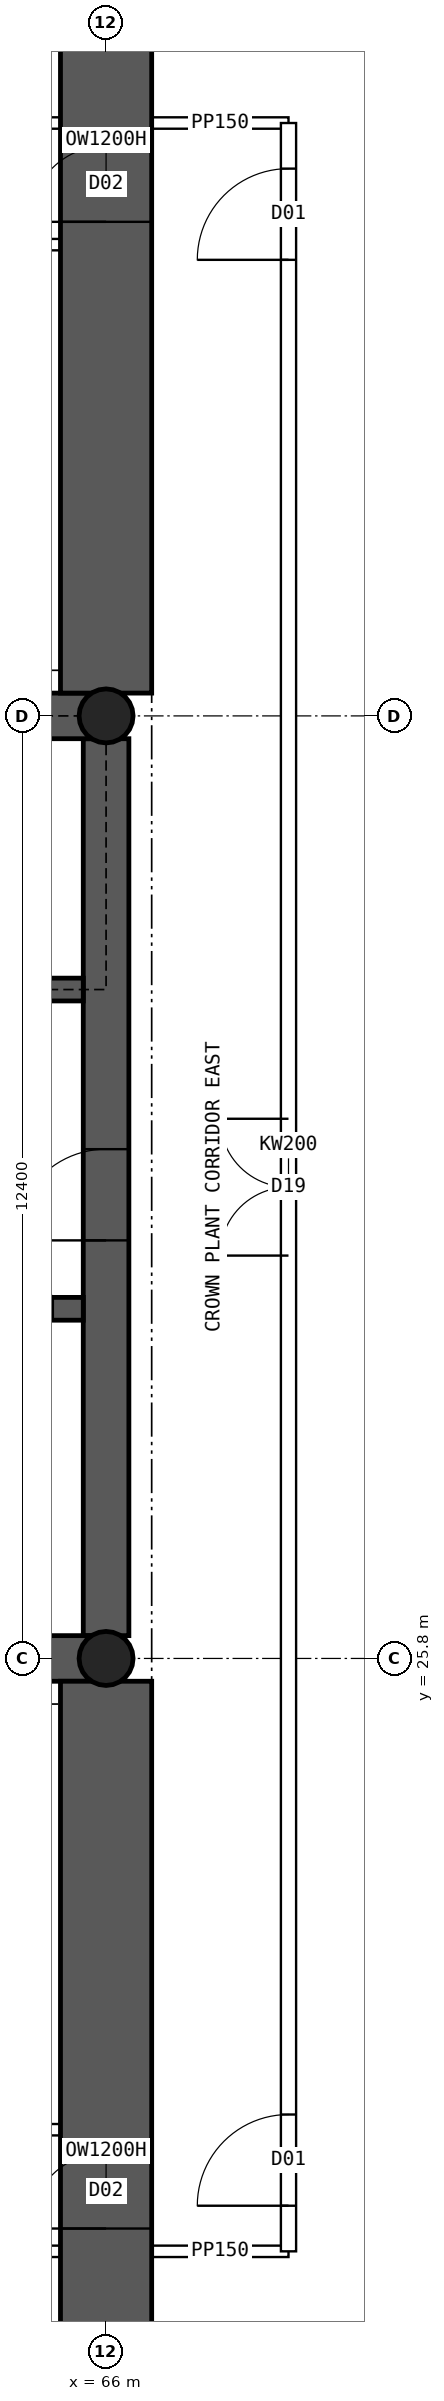
"""IFC4 building model, lengths in metres.
Left out: names, types, materials, properties, quantities, classifications, styles, units other than length and angle.
Written with IfcOpenShell. Run it as: python <this file> out.ifc"""

import sys

from ifc_helpers import new_model, si_unit, direction, frame, frame_2d, origin, origin_2d, place, context, subcontext, project, spatial, rectangle, hollow_circle, extrude, element, fill, save


model = new_model("IFC4")
c1 = context("Model", 3, precision=1e-05, world=origin(), true_north=direction((0.0, 1.0)))
c2 = subcontext(c1, "Body", "Model", "MODEL_VIEW")
j1 = project(units=[si_unit("LENGTHUNIT", "METRE"), si_unit("PLANEANGLEUNIT", "RADIAN")], contexts=[c1])
p1 = place(None, origin())
s1 = spatial("IfcSite", under=j1, at=p1, CompositionType="ELEMENT")
p2 = place(p1, origin())
s2 = spatial("IfcBuilding", under=s1, at=p2, CompositionType="ELEMENT")
p3 = place(p2, frame((0.0, 0.0, 262.3)))
s3 = spatial("IfcBuildingStorey", under=s2, at=p3, CompositionType="ELEMENT", Elevation=262.3)
for number, where, z_axis, x_axis in (
    (1, (18.0, 25.8, 0.0), (0.0, 0.0, 1.0), (1.0, 0.0, 0.0)),
    (2, (18.0, 38.2, 0.0), (0.0, 0.0, 1.0), (1.0, 0.0, 0.0)),
):
    element("IfcWall", number, at=place(p3, frame(where, z_axis=z_axis, x_axis=x_axis)), inside=s3, PredefinedType="SHEAR", context=c2, shape_type="SweptSolid", body=[
        extrude(rectangle(XDim=48.0, YDim=0.6, at=frame_2d((24.0, 0.0))), origin(), (0.0, 0.0, 1.0), 6.0),
    ])
p4 = place(p3, frame((66.0, 26.1, 0.0), z_axis=(0.0, 0.0, 1.0), x_axis=(0.0, 1.0, 0.0)))
e3 = element("IfcWall", 3, at=p4, inside=s3, PredefinedType="SHEAR", context=c2, shape_type="SweptSolid", body=[
    extrude(rectangle(XDim=11.8, YDim=0.6, at=frame_2d((5.9, 0.0))), origin(), (0.0, 0.0, 1.0), 6.0),
])
p5 = place(p4, frame((5.2, 0.0, 0.0)))
e4 = element("IfcOpeningElement", 4, at=p5, cuts=e3, PredefinedType="OPENING", context=c2, shape_type="SweptSolid", body=[
    extrude(rectangle(XDim=1.2, YDim=2.1, at=frame_2d((0.6, 1.05))), frame((0.0, 0.31, 0.0), z_axis=(0.0, -1.0, 0.0), x_axis=(1.0, 0.0, 0.0)), (0.0, 0.0, 1.0), 0.62),
])
p6 = place(p3, frame((18.3, 30.4, 0.0), z_axis=(0.0, 0.0, 1.0), x_axis=(1.0, 0.0, 0.0)))
e5 = element("IfcWall", 5, at=p6, inside=s3, PredefinedType="SHEAR", context=c2, shape_type="SweptSolid", body=[
    extrude(rectangle(XDim=47.4, YDim=0.3, at=frame_2d((23.7, 0.0))), origin(), (0.0, 0.0, 1.0), 6.0),
])
p7 = place(p6, frame((0.4, 0.0, 0.0)))
e6 = element("IfcOpeningElement", 6, at=p7, cuts=e5, PredefinedType="OPENING", context=c2, shape_type="SweptSolid", body=[
    extrude(rectangle(XDim=1.0, YDim=2.1, at=frame_2d((0.5, 1.05))), frame((0.0, 0.16, 0.0), z_axis=(0.0, -1.0, 0.0), x_axis=(1.0, 0.0, 0.0)), (0.0, 0.0, 1.0), 0.32),
])
p8 = place(p6, frame((46.0, 0.0, 0.0)))
e7 = element("IfcOpeningElement", 7, at=p8, cuts=e5, PredefinedType="OPENING", context=c2, shape_type="SweptSolid", body=[
    extrude(rectangle(XDim=1.0, YDim=2.1, at=frame_2d((0.5, 1.05))), frame((0.0, 0.16, 0.0), z_axis=(0.0, -1.0, 0.0), x_axis=(1.0, 0.0, 0.0)), (0.0, 0.0, 1.0), 0.32),
])
p9 = place(p6, frame((19.025, 0.0, 0.0)))
e8 = element("IfcOpeningElement", 8, at=p9, cuts=e5, PredefinedType="OPENING", context=c2, shape_type="SweptSolid", body=[
    extrude(rectangle(XDim=0.9, YDim=2.1, at=frame_2d((0.45, 1.05))), frame((0.0, 0.16, 0.0), z_axis=(0.0, -1.0, 0.0), x_axis=(1.0, 0.0, 0.0)), (0.0, 0.0, 1.0), 0.32),
])
p10 = place(p6, frame((24.525, 0.0, 0.0)))
e9 = element("IfcOpeningElement", 9, at=p10, cuts=e5, PredefinedType="OPENING", context=c2, shape_type="SweptSolid", body=[
    extrude(rectangle(XDim=0.9, YDim=2.1, at=frame_2d((0.45, 1.05))), frame((0.0, 0.16, 0.0), z_axis=(0.0, -1.0, 0.0), x_axis=(1.0, 0.0, 0.0)), (0.0, 0.0, 1.0), 0.32),
])
p11 = place(p6, frame((30.317, 0.0, 0.0)))
e10 = element("IfcOpeningElement", 10, at=p11, cuts=e5, PredefinedType="OPENING", context=c2, shape_type="SweptSolid", body=[
    extrude(rectangle(XDim=1.1, YDim=2.1, at=frame_2d((0.55, 1.05))), frame((0.0, 0.16, 0.0), z_axis=(0.0, -1.0, 0.0), x_axis=(1.0, 0.0, 0.0)), (0.0, 0.0, 1.0), 0.32),
])
p12 = place(p6, frame((33.85, 0.0, 0.0)))
e11 = element("IfcOpeningElement", 11, at=p12, cuts=e5, PredefinedType="OPENING", context=c2, shape_type="SweptSolid", body=[
    extrude(rectangle(XDim=1.1, YDim=2.1, at=frame_2d((0.55, 1.05))), frame((0.0, 0.16, 0.0), z_axis=(0.0, -1.0, 0.0), x_axis=(1.0, 0.0, 0.0)), (0.0, 0.0, 1.0), 0.32),
])
p13 = place(p6, frame((37.383, 0.0, 0.0)))
e12 = element("IfcOpeningElement", 12, at=p13, cuts=e5, PredefinedType="OPENING", context=c2, shape_type="SweptSolid", body=[
    extrude(rectangle(XDim=1.1, YDim=2.1, at=frame_2d((0.55, 1.05))), frame((0.0, 0.16, 0.0), z_axis=(0.0, -1.0, 0.0), x_axis=(1.0, 0.0, 0.0)), (0.0, 0.0, 1.0), 0.32),
])
p14 = place(p3, frame((18.3, 34.6, 0.0), z_axis=(0.0, 0.0, 1.0), x_axis=(1.0, 0.0, 0.0)))
e13 = element("IfcWall", 13, at=p14, inside=s3, PredefinedType="SHEAR", context=c2, shape_type="SweptSolid", body=[
    extrude(rectangle(XDim=47.4, YDim=0.3, at=frame_2d((23.7, 0.0))), origin(), (0.0, 0.0, 1.0), 6.0),
])
p15 = place(p14, frame((0.9, 0.0, 0.0)))
e14 = element("IfcOpeningElement", 14, at=p15, cuts=e13, PredefinedType="OPENING", context=c2, shape_type="SweptSolid", body=[
    extrude(rectangle(XDim=1.1, YDim=2.1, at=frame_2d((0.55, 1.05))), frame((0.0, 0.16, 0.0), z_axis=(0.0, -1.0, 0.0), x_axis=(1.0, 0.0, 0.0)), (0.0, 0.0, 1.0), 0.32),
])
p16 = place(p14, frame((45.4, 0.0, 0.0)))
e15 = element("IfcOpeningElement", 15, at=p16, cuts=e13, PredefinedType="OPENING", context=c2, shape_type="SweptSolid", body=[
    extrude(rectangle(XDim=1.1, YDim=2.1, at=frame_2d((0.55, 1.05))), frame((0.0, 0.16, 0.0), z_axis=(0.0, -1.0, 0.0), x_axis=(1.0, 0.0, 0.0)), (0.0, 0.0, 1.0), 0.32),
])
p17 = place(p14, frame((4.3, 0.0, 0.0)))
e16 = element("IfcOpeningElement", 16, at=p17, cuts=e13, PredefinedType="OPENING", context=c2, shape_type="SweptSolid", body=[
    extrude(rectangle(XDim=0.9, YDim=2.1, at=frame_2d((0.45, 1.05))), frame((0.0, 0.16, 0.0), z_axis=(0.0, -1.0, 0.0), x_axis=(1.0, 0.0, 0.0)), (0.0, 0.0, 1.0), 0.32),
])
p18 = place(p14, frame((42.2, 0.0, 0.0)))
e17 = element("IfcOpeningElement", 17, at=p18, cuts=e13, PredefinedType="OPENING", context=c2, shape_type="SweptSolid", body=[
    extrude(rectangle(XDim=0.9, YDim=2.1, at=frame_2d((0.45, 1.05))), frame((0.0, 0.16, 0.0), z_axis=(0.0, -1.0, 0.0), x_axis=(1.0, 0.0, 0.0)), (0.0, 0.0, 1.0), 0.32),
])
p19 = place(p14, frame((9.075, 0.0, 0.0)))
e18 = element("IfcOpeningElement", 18, at=p19, cuts=e13, PredefinedType="OPENING", context=c2, shape_type="SweptSolid", body=[
    extrude(rectangle(XDim=0.9, YDim=2.1, at=frame_2d((0.45, 1.05))), frame((0.0, 0.16, 0.0), z_axis=(0.0, -1.0, 0.0), x_axis=(1.0, 0.0, 0.0)), (0.0, 0.0, 1.0), 0.32),
])
p20 = place(p14, frame((13.049, 0.0, 0.0)))
e19 = element("IfcOpeningElement", 19, at=p20, cuts=e13, PredefinedType="OPENING", context=c2, shape_type="SweptSolid", body=[
    extrude(rectangle(XDim=0.9, YDim=2.1, at=frame_2d((0.45, 1.05))), frame((0.0, 0.16, 0.0), z_axis=(0.0, -1.0, 0.0), x_axis=(1.0, 0.0, 0.0)), (0.0, 0.0, 1.0), 0.32),
])
p21 = place(p14, frame((16.696, 0.0, 0.0)))
e20 = element("IfcOpeningElement", 20, at=p21, cuts=e13, PredefinedType="OPENING", context=c2, shape_type="SweptSolid", body=[
    extrude(rectangle(XDim=0.9, YDim=2.1, at=frame_2d((0.45, 1.05))), frame((0.0, 0.16, 0.0), z_axis=(0.0, -1.0, 0.0), x_axis=(1.0, 0.0, 0.0)), (0.0, 0.0, 1.0), 0.32),
])
p22 = place(p14, frame((20.455, 0.0, 0.0)))
e21 = element("IfcOpeningElement", 21, at=p22, cuts=e13, PredefinedType="OPENING", context=c2, shape_type="SweptSolid", body=[
    extrude(rectangle(XDim=0.9, YDim=2.1, at=frame_2d((0.45, 1.05))), frame((0.0, 0.16, 0.0), z_axis=(0.0, -1.0, 0.0), x_axis=(1.0, 0.0, 0.0)), (0.0, 0.0, 1.0), 0.32),
])
p23 = place(p14, frame((24.861, 0.0, 0.0)))
e22 = element("IfcOpeningElement", 22, at=p23, cuts=e13, PredefinedType="OPENING", context=c2, shape_type="SweptSolid", body=[
    extrude(rectangle(XDim=0.9, YDim=2.1, at=frame_2d((0.45, 1.05))), frame((0.0, 0.16, 0.0), z_axis=(0.0, -1.0, 0.0), x_axis=(1.0, 0.0, 0.0)), (0.0, 0.0, 1.0), 0.32),
])
p24 = place(p14, frame((27.658, 0.0, 0.0)))
e23 = element("IfcOpeningElement", 23, at=p24, cuts=e13, PredefinedType="OPENING", context=c2, shape_type="SweptSolid", body=[
    extrude(rectangle(XDim=0.9, YDim=2.1, at=frame_2d((0.45, 1.05))), frame((0.0, 0.16, 0.0), z_axis=(0.0, -1.0, 0.0), x_axis=(1.0, 0.0, 0.0)), (0.0, 0.0, 1.0), 0.32),
])
p25 = place(p14, frame((30.031, 0.0, 0.0)))
e24 = element("IfcOpeningElement", 24, at=p25, cuts=e13, PredefinedType="OPENING", context=c2, shape_type="SweptSolid", body=[
    extrude(rectangle(XDim=0.9, YDim=2.1, at=frame_2d((0.45, 1.05))), frame((0.0, 0.16, 0.0), z_axis=(0.0, -1.0, 0.0), x_axis=(1.0, 0.0, 0.0)), (0.0, 0.0, 1.0), 0.32),
])
p26 = place(p14, frame((33.881, 0.0, 0.0)))
e25 = element("IfcOpeningElement", 25, at=p26, cuts=e13, PredefinedType="OPENING", context=c2, shape_type="SweptSolid", body=[
    extrude(rectangle(XDim=0.9, YDim=2.1, at=frame_2d((0.45, 1.05))), frame((0.0, 0.16, 0.0), z_axis=(0.0, -1.0, 0.0), x_axis=(1.0, 0.0, 0.0)), (0.0, 0.0, 1.0), 0.32),
])
p27 = place(p14, frame((37.629, 0.0, 0.0)))
e26 = element("IfcOpeningElement", 26, at=p27, cuts=e13, PredefinedType="OPENING", context=c2, shape_type="SweptSolid", body=[
    extrude(rectangle(XDim=0.9, YDim=2.1, at=frame_2d((0.45, 1.05))), frame((0.0, 0.16, 0.0), z_axis=(0.0, -1.0, 0.0), x_axis=(1.0, 0.0, 0.0)), (0.0, 0.0, 1.0), 0.32),
])
p28 = place(p3, frame((66.0, 12.05, 0.0), z_axis=(0.0, 0.0, 1.0), x_axis=(0.0, 1.0, 0.0)))
e27 = element("IfcWall", 27, at=p28, inside=s3, PredefinedType="SHEAR", context=c2, shape_type="SweptSolid", body=[
    extrude(rectangle(XDim=13.45, YDim=1.2, at=frame_2d((6.725, 0.0))), origin(), (0.0, 0.0, 1.0), 4.4),
])
p29 = place(p28, frame((6.25, 0.0, 0.0)))
e28 = element("IfcOpeningElement", 28, at=p29, cuts=e27, PredefinedType="OPENING", context=c2, shape_type="SweptSolid", body=[
    extrude(rectangle(XDim=1.0, YDim=2.1, at=frame_2d((0.5, 1.05))), frame((0.0, 0.61, 0.0), z_axis=(0.0, -1.0, 0.0), x_axis=(1.0, 0.0, 0.0)), (0.0, 0.0, 1.0), 1.22),
])
p30 = place(p3, frame((66.0, 38.5, 0.0), z_axis=(0.0, 0.0, 1.0), x_axis=(0.0, 1.0, 0.0)))
e29 = element("IfcWall", 29, at=p30, inside=s3, PredefinedType="SHEAR", context=c2, shape_type="SweptSolid", body=[
    extrude(rectangle(XDim=13.45, YDim=1.2, at=frame_2d((6.725, 0.0))), origin(), (0.0, 0.0, 1.0), 4.4),
])
p31 = place(p30, frame((6.2, 0.0, 0.0)))
e30 = element("IfcOpeningElement", 30, at=p31, cuts=e29, PredefinedType="OPENING", context=c2, shape_type="SweptSolid", body=[
    extrude(rectangle(XDim=1.0, YDim=2.1, at=frame_2d((0.5, 1.05))), frame((0.0, 0.61, 0.0), z_axis=(0.0, -1.0, 0.0), x_axis=(1.0, 0.0, 0.0)), (0.0, 0.0, 1.0), 1.22),
])
p32 = place(p3, frame((66.0, 25.8, 0.0), z_axis=(0.0, 0.0, 1.0), x_axis=(1.0, 0.0, 0.0)))
e31 = element("IfcColumn", 31, at=p32, inside=s3, PredefinedType="COLUMN", context=c2, shape_type="SweptSolid", body=[
    extrude(hollow_circle(Radius=0.355, WallThickness=0.025, at=origin_2d()), origin(), (0.0, 0.0, 1.0), 8.426),
])
p33 = place(p3, frame((66.0, 38.2, 0.0), z_axis=(0.0, 0.0, 1.0), x_axis=(1.0, 0.0, 0.0)))
e32 = element("IfcColumn", 32, at=p33, inside=s3, PredefinedType="COLUMN", context=c2, shape_type="SweptSolid", body=[
    extrude(hollow_circle(Radius=0.355, WallThickness=0.025, at=origin_2d()), origin(), (0.0, 0.0, 1.0), 11.517),
])
p34 = place(p3, frame((68.4, 18.0, 0.0), z_axis=(0.0, 0.0, 1.0), x_axis=(0.0, 1.0, 0.0)))
e33 = element("IfcWall", 33, at=p34, inside=s3, PredefinedType="SOLIDWALL", context=c2, shape_type="SweptSolid", body=[
    extrude(rectangle(XDim=28.0, YDim=0.2, at=frame_2d((14.0, 0.0))), origin(), (0.0, 0.0, 1.0), 6.0),
])
p35 = place(p34, frame((13.1, 0.0, 0.0)))
e34 = element("IfcOpeningElement", 34, at=p35, cuts=e33, PredefinedType="OPENING", context=c2, shape_type="SweptSolid", body=[
    extrude(rectangle(XDim=1.8, YDim=2.1, at=frame_2d((0.9, 1.05))), frame((0.0, 0.11, 0.0), z_axis=(0.0, -1.0, 0.0), x_axis=(1.0, 0.0, 0.0)), (0.0, 0.0, 1.0), 0.22),
])
p36 = place(p34, frame((26.2, 0.0, 0.0)))
e35 = element("IfcOpeningElement", 35, at=p36, cuts=e33, PredefinedType="OPENING", context=c2, shape_type="SweptSolid", body=[
    extrude(rectangle(XDim=1.2, YDim=2.1, at=frame_2d((0.6, 1.05))), frame((0.0, 0.11, 0.0), z_axis=(0.0, -1.0, 0.0), x_axis=(1.0, 0.0, 0.0)), (0.0, 0.0, 1.0), 0.22),
])
p37 = place(p34, frame((0.6, 0.0, 0.0)))
e36 = element("IfcOpeningElement", 36, at=p37, cuts=e33, PredefinedType="OPENING", context=c2, shape_type="SweptSolid", body=[
    extrude(rectangle(XDim=1.2, YDim=2.1, at=frame_2d((0.6, 1.05))), frame((0.0, 0.11, 0.0), z_axis=(0.0, -1.0, 0.0), x_axis=(1.0, 0.0, 0.0)), (0.0, 0.0, 1.0), 0.22),
])
p38 = place(p3, frame((66.6, 18.0, 0.0), z_axis=(0.0, 0.0, 1.0), x_axis=(1.0, 0.0, 0.0)))
e37 = element("IfcWall", 37, at=p38, inside=s3, PredefinedType="PARTITIONING", context=c2, shape_type="SweptSolid", body=[
    extrude(rectangle(XDim=1.8, YDim=0.15, at=frame_2d((0.9, 0.0))), origin(), (0.0, 0.0, 1.0), 6.0),
])
p39 = place(p3, frame((60.6, 18.0, 0.0), z_axis=(0.0, 0.0, 1.0), x_axis=(1.0, 0.0, 0.0)))
e38 = element("IfcWall", 38, at=p39, inside=s3, PredefinedType="PARTITIONING", context=c2, shape_type="SweptSolid", body=[
    extrude(rectangle(XDim=4.8, YDim=0.15, at=frame_2d((2.4, 0.0))), origin(), (0.0, 0.0, 1.0), 6.0),
])
p40 = place(p39, frame((0.4, 0.0, 0.0)))
e39 = element("IfcOpeningElement", 39, at=p40, cuts=e38, PredefinedType="OPENING", context=c2, shape_type="SweptSolid", body=[
    extrude(rectangle(XDim=1.8, YDim=2.4, at=frame_2d((0.9, 1.2))), frame((0.0, 0.085, 0.0), z_axis=(0.0, -1.0, 0.0), x_axis=(1.0, 0.0, 0.0)), (0.0, 0.0, 1.0), 0.17),
])
p41 = place(p3, frame((60.6, 19.6, 0.0), z_axis=(0.0, 0.0, 1.0), x_axis=(1.0, 0.0, 0.0)))
e40 = element("IfcWall", 40, at=p41, inside=s3, PredefinedType="PARTITIONING", context=c2, shape_type="SweptSolid", body=[
    extrude(rectangle(XDim=4.8, YDim=0.15, at=frame_2d((2.4, 0.0))), origin(), (0.0, 0.0, 1.0), 6.0),
])
p42 = place(p41, frame((2.6, 0.0, 0.0)))
e41 = element("IfcOpeningElement", 41, at=p42, cuts=e40, PredefinedType="OPENING", context=c2, shape_type="SweptSolid", body=[
    extrude(rectangle(XDim=1.8, YDim=2.4, at=frame_2d((0.9, 1.2))), frame((0.0, 0.085, 0.0), z_axis=(0.0, -1.0, 0.0), x_axis=(1.0, 0.0, 0.0)), (0.0, 0.0, 1.0), 0.17),
])
p43 = place(p3, frame((66.6, 46.0, 0.0), z_axis=(0.0, 0.0, 1.0), x_axis=(1.0, 0.0, 0.0)))
e42 = element("IfcWall", 42, at=p43, inside=s3, PredefinedType="PARTITIONING", context=c2, shape_type="SweptSolid", body=[
    extrude(rectangle(XDim=1.8, YDim=0.15, at=frame_2d((0.9, 0.0))), origin(), (0.0, 0.0, 1.0), 6.0),
])
p44 = place(p3, frame((60.6, 46.0, 0.0), z_axis=(0.0, 0.0, 1.0), x_axis=(1.0, 0.0, 0.0)))
e43 = element("IfcWall", 43, at=p44, inside=s3, PredefinedType="PARTITIONING", context=c2, shape_type="SweptSolid", body=[
    extrude(rectangle(XDim=4.8, YDim=0.15, at=frame_2d((2.4, 0.0))), origin(), (0.0, 0.0, 1.0), 6.0),
])
p45 = place(p44, frame((0.4, 0.0, 0.0)))
e44 = element("IfcOpeningElement", 44, at=p45, cuts=e43, PredefinedType="OPENING", context=c2, shape_type="SweptSolid", body=[
    extrude(rectangle(XDim=1.8, YDim=2.4, at=frame_2d((0.9, 1.2))), frame((0.0, 0.085, 0.0), z_axis=(0.0, -1.0, 0.0), x_axis=(1.0, 0.0, 0.0)), (0.0, 0.0, 1.0), 0.17),
])
p46 = place(p3, frame((60.6, 44.4, 0.0), z_axis=(0.0, 0.0, 1.0), x_axis=(1.0, 0.0, 0.0)))
e45 = element("IfcWall", 45, at=p46, inside=s3, PredefinedType="PARTITIONING", context=c2, shape_type="SweptSolid", body=[
    extrude(rectangle(XDim=4.8, YDim=0.15, at=frame_2d((2.4, 0.0))), origin(), (0.0, 0.0, 1.0), 6.0),
])
p47 = place(p46, frame((2.6, 0.0, 0.0)))
e46 = element("IfcOpeningElement", 46, at=p47, cuts=e45, PredefinedType="OPENING", context=c2, shape_type="SweptSolid", body=[
    extrude(rectangle(XDim=1.8, YDim=2.4, at=frame_2d((0.9, 1.2))), frame((0.0, 0.085, 0.0), z_axis=(0.0, -1.0, 0.0), x_axis=(1.0, 0.0, 0.0)), (0.0, 0.0, 1.0), 0.17),
])
p48 = place(p5, origin())
e47 = element("IfcDoor", 47, at=p48, inside=s3, OperationType="SINGLE_SWING_LEFT", PredefinedType="DOOR", context=c2, shape_type="SweptSolid", body=[
    extrude(rectangle(XDim=1.2, YDim=2.1, at=frame_2d((0.6, 1.05))), frame((0.0, 0.025, 0.0), z_axis=(0.0, -1.0, 0.0), x_axis=(1.0, 0.0, 0.0)), (0.0, 0.0, 1.0), 0.05),
])
fill(e4, e47)
p49 = place(p35, origin())
e48 = element("IfcDoor", 48, at=p49, inside=s3, OperationType="DOUBLE_DOOR_SINGLE_SWING", PredefinedType="DOOR", context=c2, shape_type="SweptSolid", body=[
    extrude(rectangle(XDim=1.8, YDim=2.1, at=frame_2d((0.9, 1.05))), frame((0.0, 0.025, 0.0), z_axis=(0.0, -1.0, 0.0), x_axis=(1.0, 0.0, 0.0)), (0.0, 0.0, 1.0), 0.05),
])
fill(e34, e48)
p50 = place(p36, origin())
e49 = element("IfcDoor", 49, at=p50, inside=s3, OperationType="SINGLE_SWING_LEFT", PredefinedType="DOOR", context=c2, shape_type="SweptSolid", body=[
    extrude(rectangle(XDim=1.2, YDim=2.1, at=frame_2d((0.6, 1.05))), frame((0.0, 0.025, 0.0), z_axis=(0.0, -1.0, 0.0), x_axis=(1.0, 0.0, 0.0)), (0.0, 0.0, 1.0), 0.05),
])
fill(e35, e49)
p51 = place(p37, origin())
e50 = element("IfcDoor", 50, at=p51, inside=s3, OperationType="SINGLE_SWING_LEFT", PredefinedType="DOOR", context=c2, shape_type="SweptSolid", body=[
    extrude(rectangle(XDim=1.2, YDim=2.1, at=frame_2d((0.6, 1.05))), frame((0.0, 0.025, 0.0), z_axis=(0.0, -1.0, 0.0), x_axis=(1.0, 0.0, 0.0)), (0.0, 0.0, 1.0), 0.05),
])
fill(e36, e50)
p52 = place(p29, origin())
e51 = element("IfcDoor", 51, at=p52, inside=s3, OperationType="SINGLE_SWING_LEFT", PredefinedType="DOOR", context=c2, shape_type="SweptSolid", body=[
    extrude(rectangle(XDim=1.0, YDim=2.1, at=frame_2d((0.5, 1.05))), frame((0.0, 0.025, 0.0), z_axis=(0.0, -1.0, 0.0), x_axis=(1.0, 0.0, 0.0)), (0.0, 0.0, 1.0), 0.05),
])
fill(e28, e51)
p53 = place(p31, origin())
e52 = element("IfcDoor", 52, at=p53, inside=s3, OperationType="SINGLE_SWING_LEFT", PredefinedType="DOOR", context=c2, shape_type="SweptSolid", body=[
    extrude(rectangle(XDim=1.0, YDim=2.1, at=frame_2d((0.5, 1.05))), frame((0.0, 0.025, 0.0), z_axis=(0.0, -1.0, 0.0), x_axis=(1.0, 0.0, 0.0)), (0.0, 0.0, 1.0), 0.05),
])
fill(e30, e52)
save(model, sys.argv[1])
